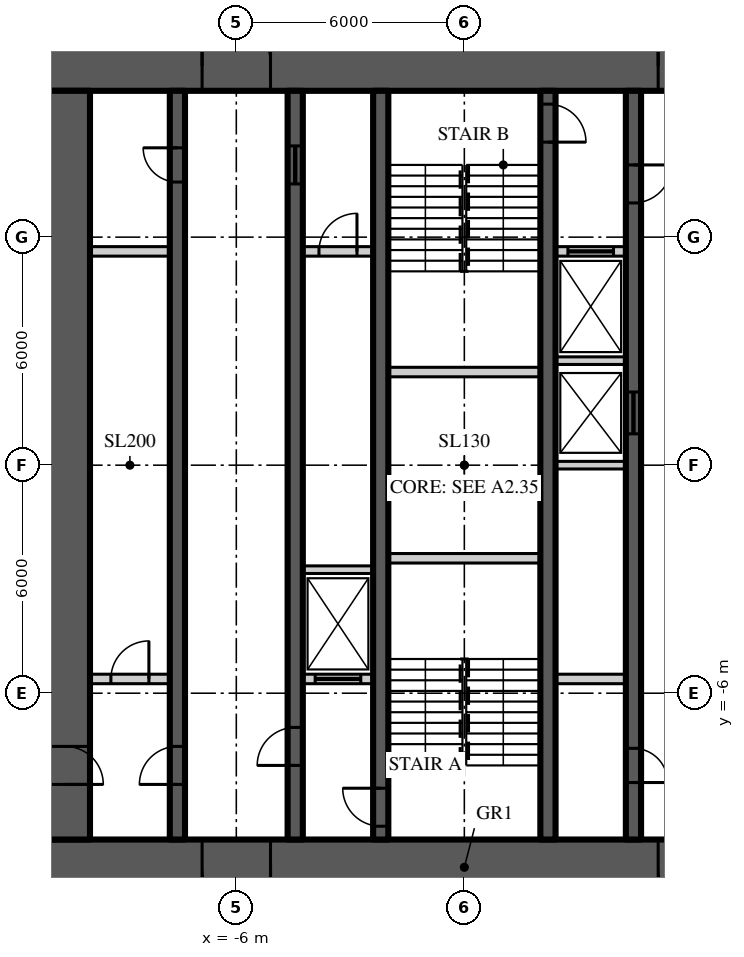
"""IFC4 building model, lengths in metres.
Left out: names, types, materials, properties, quantities, classifications, styles, units other than length and angle.
Written with IfcOpenShell. Run it as: python <this file> out.ifc"""

import sys

from ifc_helpers import new_model, si_unit, direction, frame, frame_2d, origin, place, context, subcontext, project, spatial, rectangle, extrude, element, fill, save


model = new_model("IFC4")
c1 = context("Model", 3, precision=1e-05, world=origin(), true_north=direction((0.0, 1.0)))
c2 = subcontext(c1, "Body", "Model", "MODEL_VIEW")
j1 = project(units=[si_unit("LENGTHUNIT", "METRE"), si_unit("PLANEANGLEUNIT", "RADIAN")], contexts=[c1])
p1 = place(None, origin())
s1 = spatial("IfcSite", under=j1, at=p1, CompositionType="ELEMENT")
p2 = place(p1, origin())
s2 = spatial("IfcBuilding", under=s1, at=p2, CompositionType="ELEMENT")
p3 = place(p2, frame((0.0, 0.0, 275.1)))
s3 = spatial("IfcBuildingStorey", under=s2, at=p3, CompositionType="ELEMENT", Elevation=275.1)
p4 = place(p3, frame((-11.15, 10.5, 0.0), z_axis=(0.0, 0.0, 1.0), x_axis=(1.0, 0.0, 0.0)))
e1 = element("IfcWall", 1, at=p4, inside=s3, PredefinedType="SHEAR", context=c2, shape_type="SweptSolid", body=[
    extrude(rectangle(XDim=22.3, YDim=1.3, at=frame_2d((11.15, 0.0))), origin(), (0.0, 0.0, 1.0), 3.9),
])
p5 = place(p4, frame((4.25, 0.0, 0.0)))
e2 = element("IfcOpeningElement", 2, at=p5, cuts=e1, PredefinedType="OPENING", context=c2, shape_type="SweptSolid", body=[
    extrude(rectangle(XDim=1.8, YDim=2.2, at=frame_2d((0.9, 1.1))), frame((0.0, 0.66, 0.0), z_axis=(0.0, -1.0, 0.0), x_axis=(1.0, 0.0, 0.0)), (0.0, 0.0, 1.0), 1.32),
])
p6 = place(p4, frame((16.25, 0.0, 0.0)))
e3 = element("IfcOpeningElement", 3, at=p6, cuts=e1, PredefinedType="OPENING", context=c2, shape_type="SweptSolid", body=[
    extrude(rectangle(XDim=1.8, YDim=2.2, at=frame_2d((0.9, 1.1))), frame((0.0, 0.66, 0.0), z_axis=(0.0, -1.0, 0.0), x_axis=(1.0, 0.0, 0.0)), (0.0, 0.0, 1.0), 1.32),
])
p7 = place(p3, frame((11.15, -10.5, 0.0), z_axis=(0.0, 0.0, 1.0), x_axis=(-1.0, 0.0, 0.0)))
e4 = element("IfcWall", 4, at=p7, inside=s3, PredefinedType="SHEAR", context=c2, shape_type="SweptSolid", body=[
    extrude(rectangle(XDim=22.3, YDim=1.3, at=frame_2d((11.15, 0.0))), origin(), (0.0, 0.0, 1.0), 3.9),
])
p8 = place(p7, frame((16.25, 0.0, 0.0)))
e5 = element("IfcOpeningElement", 5, at=p8, cuts=e4, PredefinedType="OPENING", context=c2, shape_type="SweptSolid", body=[
    extrude(rectangle(XDim=1.8, YDim=2.2, at=frame_2d((0.9, 1.1))), frame((0.0, 0.66, 0.0), z_axis=(0.0, -1.0, 0.0), x_axis=(1.0, 0.0, 0.0)), (0.0, 0.0, 1.0), 1.32),
])
p9 = place(p7, frame((4.25, 0.0, 0.0)))
e6 = element("IfcOpeningElement", 6, at=p9, cuts=e4, PredefinedType="OPENING", context=c2, shape_type="SweptSolid", body=[
    extrude(rectangle(XDim=1.8, YDim=2.2, at=frame_2d((0.9, 1.1))), frame((0.0, 0.66, 0.0), z_axis=(0.0, -1.0, 0.0), x_axis=(1.0, 0.0, 0.0)), (0.0, 0.0, 1.0), 1.32),
])
p10 = place(p3, frame((-10.5, 9.85, 0.0), z_axis=(0.0, 0.0, 1.0), x_axis=(0.0, -1.0, 0.0)))
e7 = element("IfcWall", 7, at=p10, inside=s3, PredefinedType="SHEAR", context=c2, shape_type="SweptSolid", body=[
    extrude(rectangle(XDim=19.7, YDim=1.3, at=frame_2d((9.85, 0.0))), origin(), (0.0, 0.0, 1.0), 3.9),
])
p11 = place(p10, frame((17.25, 0.0, 0.0)))
e8 = element("IfcOpeningElement", 8, at=p11, cuts=e7, PredefinedType="OPENING", context=c2, shape_type="SweptSolid", body=[
    extrude(rectangle(XDim=1.0, YDim=2.2, at=frame_2d((0.5, 1.1))), frame((0.0, 0.66, 0.0), z_axis=(0.0, -1.0, 0.0), x_axis=(1.0, 0.0, 0.0)), (0.0, 0.0, 1.0), 1.32),
])
p12 = place(p3, frame((-7.55, -9.85, 0.0), z_axis=(0.0, 0.0, 1.0), x_axis=(0.0, 1.0, 0.0)))
e9 = element("IfcWall", 9, at=p12, inside=s3, PredefinedType="SHEAR", context=c2, shape_type="SweptSolid", body=[
    extrude(rectangle(XDim=19.7, YDim=0.4, at=frame_2d((9.85, 0.0))), origin(), (0.0, 0.0, 1.0), 3.9),
])
p13 = place(p12, frame((1.45, 0.0, 0.0)))
e10 = element("IfcOpeningElement", 10, at=p13, cuts=e9, PredefinedType="OPENING", context=c2, shape_type="SweptSolid", body=[
    extrude(rectangle(XDim=1.0, YDim=2.2, at=frame_2d((0.5, 1.1))), frame((0.0, 0.21, 0.0), z_axis=(0.0, -1.0, 0.0), x_axis=(1.0, 0.0, 0.0)), (0.0, 0.0, 1.0), 0.42),
])
p14 = place(p12, frame((17.3, 0.0, 0.0)))
e11 = element("IfcOpeningElement", 11, at=p14, cuts=e9, PredefinedType="OPENING", context=c2, shape_type="SweptSolid", body=[
    extrude(rectangle(XDim=0.9, YDim=2.1, at=frame_2d((0.45, 1.05))), frame((0.0, 0.21, 0.0), z_axis=(0.0, -1.0, 0.0), x_axis=(1.0, 0.0, 0.0)), (0.0, 0.0, 1.0), 0.42),
])
p15 = place(p3, frame((-4.45, -9.85, 0.0), z_axis=(0.0, 0.0, 1.0), x_axis=(0.0, 1.0, 0.0)))
e12 = element("IfcWall", 12, at=p15, inside=s3, PredefinedType="SHEAR", context=c2, shape_type="SweptSolid", body=[
    extrude(rectangle(XDim=19.7, YDim=0.4, at=frame_2d((9.85, 0.0))), origin(), (0.0, 0.0, 1.0), 3.9),
])
p16 = place(p15, frame((1.95, 0.0, 0.0)))
e13 = element("IfcOpeningElement", 13, at=p16, cuts=e12, PredefinedType="OPENING", context=c2, shape_type="SweptSolid", body=[
    extrude(rectangle(XDim=1.0, YDim=2.2, at=frame_2d((0.5, 1.1))), frame((0.0, 0.21, 0.0), z_axis=(0.0, -1.0, 0.0), x_axis=(1.0, 0.0, 0.0)), (0.0, 0.0, 1.0), 0.42),
])
p17 = place(p15, frame((17.25, 0.0, 0.0)))
e14 = element("IfcOpeningElement", 14, at=p17, cuts=e12, PredefinedType="OPENING", context=c2, shape_type="SweptSolid", body=[
    extrude(rectangle(XDim=1.0, YDim=2.1, at=frame_2d((0.5, 1.05))), frame((0.0, 0.21, 0.0), z_axis=(0.0, -1.0, 0.0), x_axis=(1.0, 0.0, 0.0)), (0.0, 0.0, 1.0), 0.42),
])
p18 = place(p3, frame((4.45, 9.85, 0.0), z_axis=(0.0, 0.0, 1.0), x_axis=(0.0, -1.0, 0.0)))
e15 = element("IfcWall", 15, at=p18, inside=s3, PredefinedType="SHEAR", context=c2, shape_type="SweptSolid", body=[
    extrude(rectangle(XDim=19.7, YDim=0.4, at=frame_2d((9.85, 0.0))), origin(), (0.0, 0.0, 1.0), 3.9),
])
p19 = place(p18, frame((1.95, 0.0, 0.0)))
e16 = element("IfcOpeningElement", 16, at=p19, cuts=e15, PredefinedType="OPENING", context=c2, shape_type="SweptSolid", body=[
    extrude(rectangle(XDim=1.0, YDim=2.2, at=frame_2d((0.5, 1.1))), frame((0.0, 0.21, 0.0), z_axis=(0.0, -1.0, 0.0), x_axis=(1.0, 0.0, 0.0)), (0.0, 0.0, 1.0), 0.42),
])
p20 = place(p18, frame((17.3, 0.0, 0.0)))
e17 = element("IfcOpeningElement", 17, at=p20, cuts=e15, PredefinedType="OPENING", context=c2, shape_type="SweptSolid", body=[
    extrude(rectangle(XDim=0.9, YDim=2.1, at=frame_2d((0.45, 1.05))), frame((0.0, 0.21, 0.0), z_axis=(0.0, -1.0, 0.0), x_axis=(1.0, 0.0, 0.0)), (0.0, 0.0, 1.0), 0.42),
])
p21 = place(p18, frame((7.925, 0.0, 0.0)))
e18 = element("IfcOpeningElement", 18, at=p21, cuts=e15, PredefinedType="OPENING", context=c2, shape_type="SweptSolid", body=[
    extrude(rectangle(XDim=1.1, YDim=2.2, at=frame_2d((0.55, 1.1))), frame((0.0, 0.21, 0.0), z_axis=(0.0, -1.0, 0.0), x_axis=(1.0, 0.0, 0.0)), (0.0, 0.0, 1.0), 0.42),
])
p22 = place(p3, frame((-2.2, -9.85, 0.0), z_axis=(0.0, 0.0, 1.0), x_axis=(0.0, 1.0, 0.0)))
e19 = element("IfcWall", 19, at=p22, inside=s3, PredefinedType="SHEAR", context=c2, shape_type="SweptSolid", body=[
    extrude(rectangle(XDim=19.7, YDim=0.4, at=frame_2d((9.85, 0.0))), origin(), (0.0, 0.0, 1.0), 3.9),
])
p23 = place(p22, frame((0.35, 0.0, 0.0)))
e20 = element("IfcOpeningElement", 20, at=p23, cuts=e19, PredefinedType="OPENING", context=c2, shape_type="SweptSolid", body=[
    extrude(rectangle(XDim=1.0, YDim=2.2, at=frame_2d((0.5, 1.1))), frame((0.0, 0.21, 0.0), z_axis=(0.0, -1.0, 0.0), x_axis=(1.0, 0.0, 0.0)), (0.0, 0.0, 1.0), 0.42),
])
p24 = place(p3, frame((2.2, 9.85, 0.0), z_axis=(0.0, 0.0, 1.0), x_axis=(0.0, -1.0, 0.0)))
e21 = element("IfcWall", 21, at=p24, inside=s3, PredefinedType="SHEAR", context=c2, shape_type="SweptSolid", body=[
    extrude(rectangle(XDim=19.7, YDim=0.4, at=frame_2d((9.85, 0.0))), origin(), (0.0, 0.0, 1.0), 3.9),
])
p25 = place(p24, frame((0.35, 0.0, 0.0)))
e22 = element("IfcOpeningElement", 22, at=p25, cuts=e21, PredefinedType="OPENING", context=c2, shape_type="SweptSolid", body=[
    extrude(rectangle(XDim=1.0, YDim=2.2, at=frame_2d((0.5, 1.1))), frame((0.0, 0.21, 0.0), z_axis=(0.0, -1.0, 0.0), x_axis=(1.0, 0.0, 0.0)), (0.0, 0.0, 1.0), 0.42),
])
p26 = place(p3, frame((-9.85, 5.625, 0.0), z_axis=(0.0, 0.0, 1.0), x_axis=(1.0, 0.0, 0.0)))
e23 = element("IfcWall", 23, at=p26, inside=s3, PredefinedType="SOLIDWALL", context=c2, shape_type="SweptSolid", body=[
    extrude(rectangle(XDim=2.1, YDim=0.25, at=frame_2d((1.05, 0.0))), origin(), (0.0, 0.0, 1.0), 3.7),
])
p27 = place(p3, frame((-4.25, 5.625, 0.0), z_axis=(0.0, 0.0, 1.0), x_axis=(1.0, 0.0, 0.0)))
e24 = element("IfcWall", 24, at=p27, inside=s3, PredefinedType="SOLIDWALL", context=c2, shape_type="SweptSolid", body=[
    extrude(rectangle(XDim=1.85, YDim=0.25, at=frame_2d((0.925, 0.0))), origin(), (0.0, 0.0, 1.0), 3.7),
])
p28 = place(p27, frame((0.425, 0.0, 0.0)))
e25 = element("IfcOpeningElement", 25, at=p28, cuts=e24, PredefinedType="OPENING", context=c2, shape_type="SweptSolid", body=[
    extrude(rectangle(XDim=1.0, YDim=2.2, at=frame_2d((0.5, 1.1))), frame((0.0, 0.135, 0.0), z_axis=(0.0, -1.0, 0.0), x_axis=(1.0, 0.0, 0.0)), (0.0, 0.0, 1.0), 0.27),
])
p29 = place(p3, frame((2.4, 5.625, 0.0), z_axis=(0.0, 0.0, 1.0), x_axis=(1.0, 0.0, 0.0)))
e26 = element("IfcWall", 26, at=p29, inside=s3, PredefinedType="SOLIDWALL", context=c2, shape_type="SweptSolid", body=[
    extrude(rectangle(XDim=1.85, YDim=0.25, at=frame_2d((0.925, 0.0))), origin(), (0.0, 0.0, 1.0), 3.7),
])
p30 = place(p29, frame((0.325, 0.0, 0.0)))
e27 = element("IfcOpeningElement", 27, at=p30, cuts=e26, PredefinedType="OPENING", context=c2, shape_type="SweptSolid", body=[
    extrude(rectangle(XDim=1.2, YDim=2.2, at=frame_2d((0.6, 1.1))), frame((0.0, 0.135, 0.0), z_axis=(0.0, -1.0, 0.0), x_axis=(1.0, 0.0, 0.0)), (0.0, 0.0, 1.0), 0.27),
])
p31 = place(p3, frame((-9.85, -5.625, 0.0), z_axis=(0.0, 0.0, 1.0), x_axis=(1.0, 0.0, 0.0)))
e28 = element("IfcWall", 28, at=p31, inside=s3, PredefinedType="SOLIDWALL", context=c2, shape_type="SweptSolid", body=[
    extrude(rectangle(XDim=2.1, YDim=0.25, at=frame_2d((1.05, 0.0))), origin(), (0.0, 0.0, 1.0), 3.7),
])
p32 = place(p31, frame((0.55, 0.0, 0.0)))
e29 = element("IfcOpeningElement", 29, at=p32, cuts=e28, PredefinedType="OPENING", context=c2, shape_type="SweptSolid", body=[
    extrude(rectangle(XDim=1.0, YDim=2.2, at=frame_2d((0.5, 1.1))), frame((0.0, 0.135, 0.0), z_axis=(0.0, -1.0, 0.0), x_axis=(1.0, 0.0, 0.0)), (0.0, 0.0, 1.0), 0.27),
])
p33 = place(p3, frame((-4.25, -5.625, 0.0), z_axis=(0.0, 0.0, 1.0), x_axis=(1.0, 0.0, 0.0)))
e30 = element("IfcWall", 30, at=p33, inside=s3, PredefinedType="SOLIDWALL", context=c2, shape_type="SweptSolid", body=[
    extrude(rectangle(XDim=1.85, YDim=0.25, at=frame_2d((0.925, 0.0))), origin(), (0.0, 0.0, 1.0), 3.7),
])
p34 = place(p33, frame((0.325, 0.0, 0.0)))
e31 = element("IfcOpeningElement", 31, at=p34, cuts=e30, PredefinedType="OPENING", context=c2, shape_type="SweptSolid", body=[
    extrude(rectangle(XDim=1.2, YDim=2.2, at=frame_2d((0.6, 1.1))), frame((0.0, 0.135, 0.0), z_axis=(0.0, -1.0, 0.0), x_axis=(1.0, 0.0, 0.0)), (0.0, 0.0, 1.0), 0.27),
])
p35 = place(p3, frame((2.4, -5.625, 0.0), z_axis=(0.0, 0.0, 1.0), x_axis=(1.0, 0.0, 0.0)))
e32 = element("IfcWall", 32, at=p35, inside=s3, PredefinedType="SOLIDWALL", context=c2, shape_type="SweptSolid", body=[
    extrude(rectangle(XDim=1.85, YDim=0.25, at=frame_2d((0.925, 0.0))), origin(), (0.0, 0.0, 1.0), 3.7),
])
for number, where, z_axis, x_axis in (
    (33, (-2.0, -2.45, 0.0), (0.0, 0.0, 1.0), (1.0, 0.0, 0.0)),
    (34, (-2.0, 2.45, 0.0), (0.0, 0.0, 1.0), (1.0, 0.0, 0.0)),
):
    element("IfcWall", number, at=place(p3, frame(where, z_axis=z_axis, x_axis=x_axis)), inside=s3, PredefinedType="SOLIDWALL", context=c2, shape_type="SweptSolid", body=[
        extrude(rectangle(XDim=4.0, YDim=0.25, at=frame_2d((2.0, 0.0))), origin(), (0.0, 0.0, 1.0), 3.7),
    ])
for number, where, z_axis, x_axis in (
    (35, (-4.25, -2.75, 0.0), (0.0, 0.0, 1.0), (1.0, 0.0, 0.0)),
    (36, (2.4, 0.0, 0.0), (0.0, 0.0, 1.0), (1.0, 0.0, 0.0)),
    (37, (2.4, 2.75, 0.0), (0.0, 0.0, 1.0), (1.0, 0.0, 0.0)),
):
    element("IfcWall", number, at=place(p3, frame(where, z_axis=z_axis, x_axis=x_axis)), inside=s3, PredefinedType="SOLIDWALL", context=c2, shape_type="SweptSolid", body=[
        extrude(rectangle(XDim=1.85, YDim=0.2, at=frame_2d((0.925, 0.0))), origin(), (0.0, 0.0, 1.0), 3.7),
    ])
p36 = place(p5, origin())
e38 = element("IfcDoor", 38, at=p36, inside=s3, OperationType="DOUBLE_DOOR_DOUBLE_SWING", PredefinedType="DOOR", context=c2, shape_type="SweptSolid", body=[
    extrude(rectangle(XDim=1.8, YDim=2.2, at=frame_2d((0.9, 1.1))), frame((0.0, 0.025, 0.0), z_axis=(0.0, -1.0, 0.0), x_axis=(1.0, 0.0, 0.0)), (0.0, 0.0, 1.0), 0.05),
])
fill(e2, e38)
p37 = place(p8, origin())
e39 = element("IfcDoor", 39, at=p37, inside=s3, OperationType="DOUBLE_DOOR_DOUBLE_SWING", PredefinedType="DOOR", context=c2, shape_type="SweptSolid", body=[
    extrude(rectangle(XDim=1.8, YDim=2.2, at=frame_2d((0.9, 1.1))), frame((0.0, 0.025, 0.0), z_axis=(0.0, -1.0, 0.0), x_axis=(1.0, 0.0, 0.0)), (0.0, 0.0, 1.0), 0.05),
])
fill(e5, e39)
p38 = place(p6, origin())
e40 = element("IfcDoor", 40, at=p38, inside=s3, OperationType="DOUBLE_DOOR_DOUBLE_SWING", PredefinedType="DOOR", context=c2, shape_type="SweptSolid", body=[
    extrude(rectangle(XDim=1.8, YDim=2.2, at=frame_2d((0.9, 1.1))), frame((0.0, 0.025, 0.0), z_axis=(0.0, -1.0, 0.0), x_axis=(1.0, 0.0, 0.0)), (0.0, 0.0, 1.0), 0.05),
])
fill(e3, e40)
p39 = place(p9, origin())
e41 = element("IfcDoor", 41, at=p39, inside=s3, OperationType="DOUBLE_DOOR_DOUBLE_SWING", PredefinedType="DOOR", context=c2, shape_type="SweptSolid", body=[
    extrude(rectangle(XDim=1.8, YDim=2.2, at=frame_2d((0.9, 1.1))), frame((0.0, 0.025, 0.0), z_axis=(0.0, -1.0, 0.0), x_axis=(1.0, 0.0, 0.0)), (0.0, 0.0, 1.0), 0.05),
])
fill(e6, e41)
p40 = place(p13, origin())
e42 = element("IfcDoor", 42, at=p40, inside=s3, OperationType="SINGLE_SWING_LEFT", PredefinedType="DOOR", context=c2, shape_type="SweptSolid", body=[
    extrude(rectangle(XDim=1.0, YDim=2.2, at=frame_2d((0.5, 1.1))), frame((0.0, 0.025, 0.0), z_axis=(0.0, -1.0, 0.0), x_axis=(1.0, 0.0, 0.0)), (0.0, 0.0, 1.0), 0.05),
])
fill(e10, e42)
p41 = place(p11, origin())
e43 = element("IfcDoor", 43, at=p41, inside=s3, OperationType="SINGLE_SWING_RIGHT", PredefinedType="DOOR", context=c2, shape_type="SweptSolid", body=[
    extrude(rectangle(XDim=1.0, YDim=2.2, at=frame_2d((0.5, 1.1))), frame((0.0, 0.025, 0.0), z_axis=(0.0, -1.0, 0.0), x_axis=(1.0, 0.0, 0.0)), (0.0, 0.0, 1.0), 0.05),
])
fill(e8, e43)
p42 = place(p16, origin())
e44 = element("IfcDoor", 44, at=p42, inside=s3, OperationType="SINGLE_SWING_LEFT", PredefinedType="DOOR", context=c2, shape_type="SweptSolid", body=[
    extrude(rectangle(XDim=1.0, YDim=2.2, at=frame_2d((0.5, 1.1))), frame((0.0, 0.025, 0.0), z_axis=(0.0, -1.0, 0.0), x_axis=(1.0, 0.0, 0.0)), (0.0, 0.0, 1.0), 0.05),
])
fill(e13, e44)
p43 = place(p23, origin())
e45 = element("IfcDoor", 45, at=p43, inside=s3, OperationType="SINGLE_SWING_RIGHT", PredefinedType="DOOR", context=c2, shape_type="SweptSolid", body=[
    extrude(rectangle(XDim=1.0, YDim=2.2, at=frame_2d((0.5, 1.1))), frame((0.0, 0.025, 0.0), z_axis=(0.0, -1.0, 0.0), x_axis=(1.0, 0.0, 0.0)), (0.0, 0.0, 1.0), 0.05),
])
fill(e20, e45)
p44 = place(p19, origin())
e46 = element("IfcDoor", 46, at=p44, inside=s3, OperationType="SINGLE_SWING_LEFT", PredefinedType="DOOR", context=c2, shape_type="SweptSolid", body=[
    extrude(rectangle(XDim=1.0, YDim=2.2, at=frame_2d((0.5, 1.1))), frame((0.0, 0.025, 0.0), z_axis=(0.0, -1.0, 0.0), x_axis=(1.0, 0.0, 0.0)), (0.0, 0.0, 1.0), 0.05),
])
fill(e16, e46)
p45 = place(p25, origin())
e47 = element("IfcDoor", 47, at=p45, inside=s3, OperationType="SINGLE_SWING_RIGHT", PredefinedType="DOOR", context=c2, shape_type="SweptSolid", body=[
    extrude(rectangle(XDim=1.0, YDim=2.2, at=frame_2d((0.5, 1.1))), frame((0.0, 0.025, 0.0), z_axis=(0.0, -1.0, 0.0), x_axis=(1.0, 0.0, 0.0)), (0.0, 0.0, 1.0), 0.05),
])
fill(e22, e47)
p46 = place(p14, origin())
e48 = element("IfcDoor", 48, at=p46, inside=s3, OperationType="SINGLE_SWING_RIGHT", PredefinedType="DOOR", context=c2, shape_type="SweptSolid", body=[
    extrude(rectangle(XDim=0.9, YDim=2.1, at=frame_2d((0.45, 1.05))), frame((0.0, 0.025, 0.0), z_axis=(0.0, -1.0, 0.0), x_axis=(1.0, 0.0, 0.0)), (0.0, 0.0, 1.0), 0.05),
])
fill(e11, e48)
p47 = place(p17, origin())
e49 = element("IfcDoor", 49, at=p47, inside=s3, OperationType="SLIDING_TO_LEFT", PredefinedType="DOOR", context=c2, shape_type="SweptSolid", body=[
    extrude(rectangle(XDim=1.0, YDim=2.1, at=frame_2d((0.5, 1.05))), frame((0.0, 0.025, 0.0), z_axis=(0.0, -1.0, 0.0), x_axis=(1.0, 0.0, 0.0)), (0.0, 0.0, 1.0), 0.05),
])
fill(e14, e49)
p48 = place(p20, origin())
e50 = element("IfcDoor", 50, at=p48, inside=s3, OperationType="SINGLE_SWING_RIGHT", PredefinedType="DOOR", context=c2, shape_type="SweptSolid", body=[
    extrude(rectangle(XDim=0.9, YDim=2.1, at=frame_2d((0.45, 1.05))), frame((0.0, 0.025, 0.0), z_axis=(0.0, -1.0, 0.0), x_axis=(1.0, 0.0, 0.0)), (0.0, 0.0, 1.0), 0.05),
])
fill(e17, e50)
p49 = place(p21, origin())
e51 = element("IfcDoor", 51, at=p49, inside=s3, OperationType="SLIDING_TO_LEFT", PredefinedType="DOOR", context=c2, shape_type="SweptSolid", body=[
    extrude(rectangle(XDim=1.1, YDim=2.2, at=frame_2d((0.55, 1.1))), frame((0.0, 0.025, 0.0), z_axis=(0.0, -1.0, 0.0), x_axis=(1.0, 0.0, 0.0)), (0.0, 0.0, 1.0), 0.05),
])
fill(e18, e51)
p50 = place(p34, origin())
e52 = element("IfcDoor", 52, at=p50, inside=s3, OperationType="SLIDING_TO_LEFT", PredefinedType="DOOR", context=c2, shape_type="SweptSolid", body=[
    extrude(rectangle(XDim=1.2, YDim=2.2, at=frame_2d((0.6, 1.1))), frame((0.0, 0.025, 0.0), z_axis=(0.0, -1.0, 0.0), x_axis=(1.0, 0.0, 0.0)), (0.0, 0.0, 1.0), 0.05),
])
fill(e31, e52)
p51 = place(p30, origin())
e53 = element("IfcDoor", 53, at=p51, inside=s3, OperationType="SLIDING_TO_LEFT", PredefinedType="DOOR", context=c2, shape_type="SweptSolid", body=[
    extrude(rectangle(XDim=1.2, YDim=2.2, at=frame_2d((0.6, 1.1))), frame((0.0, 0.025, 0.0), z_axis=(0.0, -1.0, 0.0), x_axis=(1.0, 0.0, 0.0)), (0.0, 0.0, 1.0), 0.05),
])
fill(e27, e53)
p52 = place(p32, origin())
e54 = element("IfcDoor", 54, at=p52, inside=s3, OperationType="SINGLE_SWING_RIGHT", PredefinedType="DOOR", context=c2, shape_type="SweptSolid", body=[
    extrude(rectangle(XDim=1.0, YDim=2.2, at=frame_2d((0.5, 1.1))), frame((0.0, 0.025, 0.0), z_axis=(0.0, -1.0, 0.0), x_axis=(1.0, 0.0, 0.0)), (0.0, 0.0, 1.0), 0.05),
])
fill(e29, e54)
p53 = place(p28, origin())
e55 = element("IfcDoor", 55, at=p53, inside=s3, OperationType="SINGLE_SWING_RIGHT", PredefinedType="DOOR", context=c2, shape_type="SweptSolid", body=[
    extrude(rectangle(XDim=1.0, YDim=2.2, at=frame_2d((0.5, 1.1))), frame((0.0, 0.025, 0.0), z_axis=(0.0, -1.0, 0.0), x_axis=(1.0, 0.0, 0.0)), (0.0, 0.0, 1.0), 0.05),
])
fill(e25, e55)
save(model, sys.argv[1])
